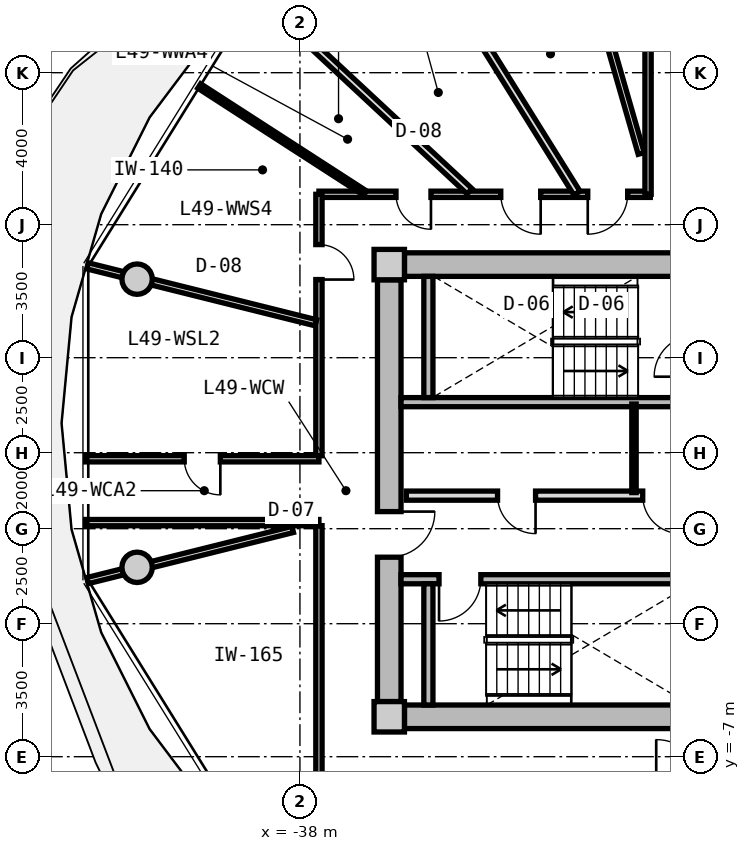
"""IFC4 building model, lengths in metres.
Left out: names, types, materials, properties, quantities, classifications, styles, units other than length and angle.
Written with IfcOpenShell. Run it as: python <this file> out.ifc"""

import sys

from ifc_helpers import new_model, si_unit, direction, frame, frame_2d, origin, origin_2d, place, context, subcontext, project, spatial, rectangle, circle, extrude, source, transform, mapped, element, fill, save


model = new_model("IFC4")
c1 = context("Model", 3, precision=1e-05, world=origin(), true_north=direction((0.0, 1.0)))
c2 = subcontext(c1, "Body", "Model", "MODEL_VIEW")
j1 = project(units=[si_unit("LENGTHUNIT", "METRE"), si_unit("PLANEANGLEUNIT", "RADIAN")], contexts=[c1])
p1 = place(None, origin())
s1 = spatial("IfcSite", under=j1, at=p1, CompositionType="ELEMENT")
p2 = place(p1, origin())
s2 = spatial("IfcBuilding", under=s1, at=p2, CompositionType="ELEMENT")
p3 = place(p2, frame((0.0, 0.0, 158.7)))
s3 = spatial("IfcBuildingStorey", under=s2, at=p3, CompositionType="ELEMENT", Elevation=158.7)
m1 = source(origin(), c2, "Body", "SweptSolid", [
    extrude(rectangle(XDim=0.8, YDim=0.8, at=origin_2d()), origin(), (0.0, 0.0, 1.0), 3.05),
])
for number, where, z_axis, x_axis in (
    (1, (-35.65, -5.95, 0.0), (0.0, 0.0, 1.0), (1.0, 0.0, 0.0)),
    (2, (-35.65, 5.95, 0.0), (0.0, 0.0, 1.0), (1.0, 0.0, 0.0)),
):
    element("IfcColumn", number, at=place(p3, frame(where, z_axis=z_axis, x_axis=x_axis)), inside=s3, PredefinedType="COLUMN", context=c2, shape_type="MappedRepresentation", body=[
        mapped(m1, transform((0.0, 0.0, 0.0), x_axis=(1.0, 0.0, 0.0), y_axis=(0.0, 1.0, 0.0), z_axis=(0.0, 0.0, 1.0), scale=1.0)),
    ])
m2 = source(origin(), c2, "Body", "SweptSolid", [
    extrude(rectangle(XDim=14.5, YDim=0.62, at=frame_2d((7.25, 0.0))), origin(), (0.0, 0.0, 1.0), 2.81),
])
for number, where, z_axis, x_axis in (
    (3, (-35.25, 5.95, 0.0), (0.0, 0.0, 1.0), (1.0, 0.0, 0.0)),
    (4, (-20.75, -5.95, 0.0), (0.0, 0.0, 1.0), (-1.0, 0.0, 0.0)),
):
    element("IfcWall", number, at=place(p3, frame(where, z_axis=z_axis, x_axis=x_axis)), inside=s3, PredefinedType="SHEAR", context=c2, shape_type="MappedRepresentation", body=[
        mapped(m2, transform((0.0, 0.0, 0.0), x_axis=(1.0, 0.0, 0.0), y_axis=(0.0, 1.0, 0.0), z_axis=(0.0, 0.0, 1.0), scale=1.0)),
    ])
m3 = source(origin(), c2, "Body", "SweptSolid", [
    extrude(rectangle(XDim=11.1, YDim=0.62, at=frame_2d((5.55, 0.0))), origin(), (0.0, 0.0, 1.0), 2.81),
])
p4 = place(p3, frame((-35.65, -5.55, 0.0), z_axis=(0.0, 0.0, 1.0), x_axis=(0.0, 1.0, 0.0)))
e5 = element("IfcWall", 5, at=p4, inside=s3, PredefinedType="SHEAR", context=c2, shape_type="MappedRepresentation", body=[
    mapped(m3, transform((0.0, 0.0, 0.0), x_axis=(1.0, 0.0, 0.0), y_axis=(0.0, 1.0, 0.0), z_axis=(0.0, 0.0, 1.0), scale=1.0)),
])
p5 = place(p4, frame((3.8, 0.0, 0.0)))
e6 = element("IfcOpeningElement", 6, at=p5, cuts=e5, PredefinedType="OPENING", context=c2, shape_type="SweptSolid", body=[
    extrude(rectangle(XDim=1.2, YDim=2.15, at=frame_2d((0.6, 1.075))), frame((0.0, 0.32, 0.0), z_axis=(0.0, -1.0, 0.0), x_axis=(1.0, 0.0, 0.0)), (0.0, 0.0, 1.0), 0.64),
])
m4 = source(origin(), c2, "Body", "SweptSolid", [
    extrude(circle(Radius=0.4, at=origin_2d()), origin(), (0.0, 0.0, 1.0), 3.05),
])
for number, where, z_axis, x_axis in (
    (7, (-42.285, 5.567, 0.0), (0.0, 0.0, 1.0), (1.0, 0.0, 0.0)),
    (8, (-42.285, -2.016, 0.0), (0.0, 0.0, 1.0), (1.0, 0.0, 0.0)),
):
    element("IfcColumn", number, at=place(p3, frame(where, z_axis=z_axis, x_axis=x_axis)), inside=s3, PredefinedType="COLUMN", context=c2, shape_type="MappedRepresentation", body=[
        mapped(m4, transform((0.0, 0.0, 0.0), x_axis=(1.0, 0.0, 0.0), y_axis=(0.0, 1.0, 0.0), z_axis=(0.0, 0.0, 1.0), scale=1.0)),
    ])
m5 = source(origin(), c2, "Body", "SweptSolid", [
    extrude(rectangle(XDim=7.88, YDim=0.24, at=frame_2d((3.94, 0.0))), origin(), (0.0, 0.0, 1.0), 2.81),
])
p6 = place(p3, frame((-35.34, 2.33, 0.0), z_axis=(0.0, 0.0, 1.0), x_axis=(1.0, 0.0, 0.0)))
e9 = element("IfcWall", 9, at=p6, inside=s3, PredefinedType="PARTITIONING", context=c2, shape_type="MappedRepresentation", body=[
    mapped(m5, transform((0.0, 0.0, 0.0), x_axis=(1.0, 0.0, 0.0), y_axis=(0.0, 1.0, 0.0), z_axis=(0.0, 0.0, 1.0), scale=1.0)),
])
m6 = source(origin(), c2, "Body", "SweptSolid", [
    extrude(rectangle(XDim=3.19, YDim=0.24, at=frame_2d((1.595, 0.0))), origin(), (0.0, 0.0, 1.0), 2.81),
])
p7 = place(p3, frame((-34.62, 2.45, 0.0), z_axis=(0.0, 0.0, 1.0), x_axis=(0.0, 1.0, 0.0)))
e10 = element("IfcWall", 10, at=p7, inside=s3, PredefinedType="PARTITIONING", context=c2, shape_type="MappedRepresentation", body=[
    mapped(m6, transform((0.0, 0.0, 0.0), x_axis=(1.0, 0.0, 0.0), y_axis=(0.0, 1.0, 0.0), z_axis=(0.0, 0.0, 1.0), scale=1.0)),
])
p8 = place(p3, frame((-35.34, -2.33, 0.0), z_axis=(0.0, 0.0, 1.0), x_axis=(1.0, 0.0, 0.0)))
e11 = element("IfcWall", 11, at=p8, inside=s3, PredefinedType="PARTITIONING", context=c2, shape_type="MappedRepresentation", body=[
    mapped(m5, transform((0.0, 0.0, 0.0), x_axis=(1.0, 0.0, 0.0), y_axis=(0.0, 1.0, 0.0), z_axis=(0.0, 0.0, 1.0), scale=1.0)),
])
p9 = place(p8, frame((1.0, 0.0, 0.0)))
e12 = element("IfcOpeningElement", 12, at=p9, cuts=e11, PredefinedType="OPENING", context=c2, shape_type="SweptSolid", body=[
    extrude(rectangle(XDim=1.1, YDim=2.15, at=frame_2d((0.55, 1.075))), frame((0.0, 0.13, 0.0), z_axis=(0.0, -1.0, 0.0), x_axis=(1.0, 0.0, 0.0)), (0.0, 0.0, 1.0), 0.26),
])
p10 = place(p3, frame((-34.62, -5.64, 0.0), z_axis=(0.0, 0.0, 1.0), x_axis=(0.0, 1.0, 0.0)))
e13 = element("IfcWall", 13, at=p10, inside=s3, PredefinedType="PARTITIONING", context=c2, shape_type="MappedRepresentation", body=[
    mapped(m6, transform((0.0, 0.0, 0.0), x_axis=(1.0, 0.0, 0.0), y_axis=(0.0, 1.0, 0.0), z_axis=(0.0, 0.0, 1.0), scale=1.0)),
])
m7 = source(origin(), c2, "Body", "SweptSolid", [
    extrude(rectangle(XDim=7.62, YDim=0.24, at=frame_2d((3.81, 0.0))), origin(), (0.0, 0.0, 1.0), 2.795),
])
p11 = place(p3, frame((-35.2, -0.13, 0.0), z_axis=(0.0, 0.0, 1.0), x_axis=(1.0, 0.0, 0.0)))
e14 = element("IfcWall", 14, at=p11, inside=s3, PredefinedType="PARTITIONING", context=c2, shape_type="MappedRepresentation", body=[
    mapped(m7, transform((0.0, 0.0, 0.0), x_axis=(1.0, 0.0, 0.0), y_axis=(0.0, 1.0, 0.0), z_axis=(0.0, 0.0, 1.0), scale=1.0)),
])
p12 = place(p11, frame((6.22, 0.0, 0.0)))
e15 = element("IfcOpeningElement", 15, at=p12, cuts=e14, PredefinedType="OPENING", context=c2, shape_type="SweptSolid", body=[
    extrude(rectangle(XDim=1.0, YDim=2.1, at=frame_2d((0.5, 1.05))), frame((0.0, 0.13, 0.0), z_axis=(0.0, -1.0, 0.0), x_axis=(1.0, 0.0, 0.0)), (0.0, 0.0, 1.0), 0.26),
])
p13 = place(p11, frame((2.4, 0.0, 0.0)))
e16 = element("IfcOpeningElement", 16, at=p13, cuts=e14, PredefinedType="OPENING", context=c2, shape_type="SweptSolid", body=[
    extrude(rectangle(XDim=1.0, YDim=2.1, at=frame_2d((0.5, 1.05))), frame((0.0, 0.13, 0.0), z_axis=(0.0, -1.0, 0.0), x_axis=(1.0, 0.0, 0.0)), (0.0, 0.0, 1.0), 0.26),
])
m8 = source(origin(), c2, "Body", "SweptSolid", [
    extrude(rectangle(XDim=2.33, YDim=0.115, at=frame_2d((1.165, 0.0))), origin(), (0.0, 0.0, 1.0), 2.795),
])
p14 = place(p3, frame((-29.21, -0.05, 0.0), z_axis=(0.0, 0.0, 1.0), x_axis=(0.0, 1.0, 0.0)))
e17 = element("IfcWall", 17, at=p14, inside=s3, PredefinedType="PARTITIONING", context=c2, shape_type="MappedRepresentation", body=[
    mapped(m8, transform((0.0, 0.0, 0.0), x_axis=(1.0, 0.0, 0.0), y_axis=(0.0, 1.0, 0.0), z_axis=(0.0, 0.0, 1.0), scale=1.0)),
])
m9 = source(origin(), c2, "Body", "SweptSolid", [
    extrude(rectangle(XDim=8.719, YDim=0.165, at=frame_2d((4.36, 0.0))), origin(), (0.0, 0.0, 1.0), 2.795),
])
p15 = place(p3, frame((-37.5, 7.8, 0.0), z_axis=(0.0, 0.0, 1.0), x_axis=(1.0, 0.0, 0.0)))
e18 = element("IfcWall", 18, at=p15, inside=s3, PredefinedType="PARTITIONING", context=c2, shape_type="MappedRepresentation", body=[
    mapped(m9, transform((0.0, 0.0, 0.0), x_axis=(1.0, 0.0, 0.0), y_axis=(0.0, 1.0, 0.0), z_axis=(0.0, 0.0, 1.0), scale=1.0)),
])
p16 = place(p15, frame((7.073, 0.0, 0.0)))
e19 = element("IfcOpeningElement", 19, at=p16, cuts=e18, PredefinedType="OPENING", context=c2, shape_type="SweptSolid", body=[
    extrude(rectangle(XDim=1.05, YDim=2.15, at=frame_2d((0.525, 1.075))), frame((0.0, 0.093, 0.0), z_axis=(0.0, -1.0, 0.0), x_axis=(1.0, 0.0, 0.0)), (0.0, 0.0, 1.0), 0.185),
])
p17 = place(p15, frame((4.785, 0.0, 0.0)))
e20 = element("IfcOpeningElement", 20, at=p17, cuts=e18, PredefinedType="OPENING", context=c2, shape_type="SweptSolid", body=[
    extrude(rectangle(XDim=1.05, YDim=2.15, at=frame_2d((0.525, 1.075))), frame((0.0, 0.093, 0.0), z_axis=(0.0, -1.0, 0.0), x_axis=(1.0, 0.0, 0.0)), (0.0, 0.0, 1.0), 0.185),
])
p18 = place(p15, frame((2.028, 0.0, 0.0)))
e21 = element("IfcOpeningElement", 21, at=p18, cuts=e18, PredefinedType="OPENING", context=c2, shape_type="SweptSolid", body=[
    extrude(rectangle(XDim=0.92, YDim=2.1, at=frame_2d((0.46, 1.05))), frame((0.0, 0.093, 0.0), z_axis=(0.0, -1.0, 0.0), x_axis=(1.0, 0.0, 0.0)), (0.0, 0.0, 1.0), 0.185),
])
m10 = source(origin(), c2, "Body", "SweptSolid", [
    extrude(rectangle(XDim=6.88, YDim=0.165, at=frame_2d((3.44, 0.0))), origin(), (0.0, 0.0, 1.0), 2.795),
])
p19 = place(p3, frame((-37.5, -7.8, 0.0), z_axis=(0.0, 0.0, 1.0), x_axis=(0.0, 1.0, 0.0)))
e22 = element("IfcWall", 22, at=p19, inside=s3, PredefinedType="PARTITIONING", context=c2, shape_type="MappedRepresentation", body=[
    mapped(m10, transform((0.0, 0.0, 0.0), x_axis=(1.0, 0.0, 0.0), y_axis=(0.0, 1.0, 0.0), z_axis=(0.0, 0.0, 1.0), scale=1.0)),
])
p20 = place(p3, frame((-37.5, 0.92, 0.0), z_axis=(0.0, 0.0, 1.0), x_axis=(0.0, 1.0, 0.0)))
e23 = element("IfcWall", 23, at=p20, inside=s3, PredefinedType="PARTITIONING", context=c2, shape_type="MappedRepresentation", body=[
    mapped(m10, transform((0.0, 0.0, 0.0), x_axis=(1.0, 0.0, 0.0), y_axis=(0.0, 1.0, 0.0), z_axis=(0.0, 0.0, 1.0), scale=1.0)),
])
p21 = place(p20, frame((4.636, 0.0, 0.0)))
e24 = element("IfcOpeningElement", 24, at=p21, cuts=e23, PredefinedType="OPENING", context=c2, shape_type="SweptSolid", body=[
    extrude(rectangle(XDim=0.92, YDim=2.1, at=frame_2d((0.46, 1.05))), frame((0.0, 0.093, 0.0), z_axis=(0.0, -1.0, 0.0), x_axis=(1.0, 0.0, 0.0)), (0.0, 0.0, 1.0), 0.185),
])
m11 = source(origin(), c2, "Body", "SweptSolid", [
    extrude(rectangle(XDim=8.695, YDim=0.165, at=frame_2d((4.348, 0.0))), origin(), (0.0, 0.0, 1.0), 2.345),
])
p22 = place(p3, frame((-29.02, 8.875, 0.0), z_axis=(0.0, 0.0, 1.0), x_axis=(-0.276797231892, 0.960928349263, 0.0)))
e25 = element("IfcWall", 25, at=p22, inside=s3, PredefinedType="PARTITIONING", context=c2, shape_type="MappedRepresentation", body=[
    mapped(m11, transform((0.0, 0.0, 0.0), x_axis=(1.0, 0.0, 0.0), y_axis=(0.0, 1.0, 0.0), z_axis=(0.0, 0.0, 1.0), scale=1.0)),
])
m12 = source(origin(), c2, "Body", "SweptSolid", [
    extrude(rectangle(XDim=6.193, YDim=0.165, at=frame_2d((3.096, 0.0))), origin(), (0.0, 0.0, 1.0), 2.345),
])
p23 = place(p3, frame((-37.58, 4.419, 0.0), z_axis=(0.0, 0.0, 1.0), x_axis=(-0.970309243466, 0.241867674657, 0.0)))
e26 = element("IfcWall", 26, at=p23, inside=s3, PredefinedType="PARTITIONING", context=c2, shape_type="MappedRepresentation", body=[
    mapped(m12, transform((0.0, 0.0, 0.0), x_axis=(1.0, 0.0, 0.0), y_axis=(0.0, 1.0, 0.0), z_axis=(0.0, 0.0, 1.0), scale=1.0)),
])
m13 = source(origin(), c2, "Body", "SweptSolid", [
    extrude(rectangle(XDim=5.564, YDim=0.165, at=frame_2d((2.782, 0.0))), origin(), (0.0, 0.0, 1.0), 2.345),
])
p24 = place(p3, frame((-38.19, -1.02, 0.0), z_axis=(0.0, 0.0, 1.0), x_axis=(-0.97031260977, -0.241854169533, 0.0)))
e27 = element("IfcWall", 27, at=p24, inside=s3, PredefinedType="PARTITIONING", context=c2, shape_type="MappedRepresentation", body=[
    mapped(m13, transform((0.0, 0.0, 0.0), x_axis=(1.0, 0.0, 0.0), y_axis=(0.0, 1.0, 0.0), z_axis=(0.0, 0.0, 1.0), scale=1.0)),
])
m14 = source(origin(), c2, "Body", "SweptSolid", [
    extrude(rectangle(XDim=9.48, YDim=0.165, at=frame_2d((4.74, 0.0))), origin(), (0.0, 0.0, 1.0), 2.795),
])
p25 = place(p3, frame((-28.84, 7.8, 0.0), z_axis=(0.0, 0.0, 1.0), x_axis=(0.0, 1.0, 0.0)))
e28 = element("IfcWall", 28, at=p25, inside=s3, PredefinedType="PARTITIONING", context=c2, shape_type="MappedRepresentation", body=[
    mapped(m14, transform((0.0, 0.0, 0.0), x_axis=(1.0, 0.0, 0.0), y_axis=(0.0, 1.0, 0.0), z_axis=(0.0, 0.0, 1.0), scale=1.0)),
])
p26 = place(p25, frame((4.521, 0.0, 0.0)))
e29 = element("IfcOpeningElement", 29, at=p26, cuts=e28, PredefinedType="OPENING", context=c2, shape_type="SweptSolid", body=[
    extrude(rectangle(XDim=0.95, YDim=2.1, at=frame_2d((0.475, 1.05))), frame((0.0, 0.093, 0.0), z_axis=(0.0, -1.0, 0.0), x_axis=(1.0, 0.0, 0.0)), (0.0, 0.0, 1.0), 0.185),
])
m15 = source(origin(), c2, "Body", "SweptSolid", [
    extrude(rectangle(XDim=6.139, YDim=0.165, at=frame_2d((3.069, 0.0))), origin(), (0.0, 0.0, 1.0), 2.795),
])
p27 = place(p3, frame((-43.639, 0.84, 0.0), z_axis=(0.0, 0.0, 1.0), x_axis=(1.0, 0.0, 0.0)))
e30 = element("IfcWall", 30, at=p27, inside=s3, PredefinedType="PARTITIONING", context=c2, shape_type="MappedRepresentation", body=[
    mapped(m15, transform((0.0, 0.0, 0.0), x_axis=(1.0, 0.0, 0.0), y_axis=(0.0, 1.0, 0.0), z_axis=(0.0, 0.0, 1.0), scale=1.0)),
])
p28 = place(p27, frame((2.594, 0.0, 0.0)))
e31 = element("IfcOpeningElement", 31, at=p28, cuts=e30, PredefinedType="OPENING", context=c2, shape_type="SweptSolid", body=[
    extrude(rectangle(XDim=0.95, YDim=2.1, at=frame_2d((0.475, 1.05))), frame((0.0, 0.093, 0.0), z_axis=(0.0, -1.0, 0.0), x_axis=(1.0, 0.0, 0.0)), (0.0, 0.0, 1.0), 0.185),
])
p29 = place(p3, frame((-37.5, -0.84, 0.0), z_axis=(0.0, 0.0, 1.0), x_axis=(-1.0, 0.0, 0.0)))
e32 = element("IfcWall", 32, at=p29, inside=s3, PredefinedType="PARTITIONING", context=c2, shape_type="MappedRepresentation", body=[
    mapped(m15, transform((0.0, 0.0, 0.0), x_axis=(1.0, 0.0, 0.0), y_axis=(0.0, 1.0, 0.0), z_axis=(0.0, 0.0, 1.0), scale=1.0)),
])
m16 = source(origin(), c2, "Body", "SweptSolid", [
    extrude(rectangle(XDim=7.648, YDim=0.19, at=frame_2d((3.824, 0.0))), origin(), (0.0, 0.0, 1.0), 2.345),
])
p30 = place(p3, frame((-33.538, 7.88, 0.0), z_axis=(0.0, 0.0, 1.0), x_axis=(-0.732167856666, 0.681124239522, 0.0)))
e33 = element("IfcWall", 33, at=p30, inside=s3, PredefinedType="PARTITIONING", context=c2, shape_type="MappedRepresentation", body=[
    mapped(m16, transform((0.0, 0.0, 0.0), x_axis=(1.0, 0.0, 0.0), y_axis=(0.0, 1.0, 0.0), z_axis=(0.0, 0.0, 1.0), scale=1.0)),
])
m17 = source(origin(), c2, "Body", "SweptSolid", [
    extrude(rectangle(XDim=8.638, YDim=0.19, at=frame_2d((4.319, 0.0))), origin(), (0.0, 0.0, 1.0), 2.795),
])
p31 = place(p3, frame((-30.711, 7.83, 0.0), z_axis=(0.0, 0.0, 1.0), x_axis=(-0.529150133108, 0.848528217935, 0.0)))
e34 = element("IfcWall", 34, at=p31, inside=s3, PredefinedType="PARTITIONING", context=c2, shape_type="MappedRepresentation", body=[
    mapped(m17, transform((0.0, 0.0, 0.0), x_axis=(1.0, 0.0, 0.0), y_axis=(0.0, 1.0, 0.0), z_axis=(0.0, 0.0, 1.0), scale=1.0)),
])
m18 = source(origin(), c2, "Body", "SweptSolid", [
    extrude(rectangle(XDim=5.197, YDim=0.14, at=frame_2d((2.598, 0.0))), origin(), (0.0, 0.0, 1.0), 2.795),
])
p32 = place(p3, frame((-36.286, 7.83, 0.0), z_axis=(0.0, 0.0, 1.0), x_axis=(-0.839929187515, 0.542696010637, 0.0)))
e35 = element("IfcWall", 35, at=p32, inside=s3, PredefinedType="PARTITIONING", context=c2, shape_type="MappedRepresentation", body=[
    mapped(m18, transform((0.0, 0.0, 0.0), x_axis=(1.0, 0.0, 0.0), y_axis=(0.0, 1.0, 0.0), z_axis=(0.0, 0.0, 1.0), scale=1.0)),
])
m19 = source(origin(), c2, "Body", "SweptSolid", [
    extrude(rectangle(XDim=1.1, YDim=2.15, at=frame_2d((0.55, 1.075))), frame((0.0, 0.025, 0.0), z_axis=(0.0, -1.0, 0.0), x_axis=(1.0, 0.0, 0.0)), (0.0, 0.0, 1.0), 0.05),
])
p33 = place(p9, frame((1.1, 0.0, 0.0), z_axis=(0.0, 0.0, 1.0), x_axis=(-1.0, 0.0, 0.0)))
e36 = element("IfcDoor", 36, at=p33, inside=s3, OperationType="SINGLE_SWING_RIGHT", PredefinedType="DOOR", context=c2, shape_type="MappedRepresentation", body=[
    mapped(m19, transform((0.0, 0.0, 0.0), x_axis=(1.0, 0.0, 0.0), y_axis=(0.0, 1.0, 0.0), z_axis=(0.0, 0.0, 1.0), scale=1.0)),
])
fill(e12, e36)
m20 = source(origin(), c2, "Body", "SweptSolid", [
    extrude(rectangle(XDim=1.2, YDim=2.15, at=frame_2d((0.6, 1.075))), frame((0.0, 0.025, 0.0), z_axis=(0.0, -1.0, 0.0), x_axis=(1.0, 0.0, 0.0)), (0.0, 0.0, 1.0), 0.05),
])
p34 = place(p5, frame((1.2, 0.0, 0.0), z_axis=(0.0, 0.0, 1.0), x_axis=(-1.0, 0.0, 0.0)))
e37 = element("IfcDoor", 37, at=p34, inside=s3, OperationType="SINGLE_SWING_LEFT", PredefinedType="DOOR", context=c2, shape_type="MappedRepresentation", body=[
    mapped(m20, transform((0.0, 0.0, 0.0), x_axis=(1.0, 0.0, 0.0), y_axis=(0.0, 1.0, 0.0), z_axis=(0.0, 0.0, 1.0), scale=1.0)),
])
fill(e6, e37)
m21 = source(origin(), c2, "Body", "SweptSolid", [
    extrude(rectangle(XDim=1.0, YDim=2.1, at=frame_2d((0.5, 1.05))), frame((0.0, 0.025, 0.0), z_axis=(0.0, -1.0, 0.0), x_axis=(1.0, 0.0, 0.0)), (0.0, 0.0, 1.0), 0.05),
])
p35 = place(p12, frame((1.0, 0.0, 0.0), z_axis=(0.0, 0.0, 1.0), x_axis=(-1.0, 0.0, 0.0)))
e38 = element("IfcDoor", 38, at=p35, inside=s3, OperationType="SINGLE_SWING_LEFT", PredefinedType="DOOR", context=c2, shape_type="MappedRepresentation", body=[
    mapped(m21, transform((0.0, 0.0, 0.0), x_axis=(1.0, 0.0, 0.0), y_axis=(0.0, 1.0, 0.0), z_axis=(0.0, 0.0, 1.0), scale=1.0)),
])
fill(e15, e38)
p36 = place(p13, frame((1.0, 0.0, 0.0), z_axis=(0.0, 0.0, 1.0), x_axis=(-1.0, 0.0, 0.0)))
e39 = element("IfcDoor", 39, at=p36, inside=s3, OperationType="SINGLE_SWING_LEFT", PredefinedType="DOOR", context=c2, shape_type="MappedRepresentation", body=[
    mapped(m21, transform((0.0, 0.0, 0.0), x_axis=(1.0, 0.0, 0.0), y_axis=(0.0, 1.0, 0.0), z_axis=(0.0, 0.0, 1.0), scale=1.0)),
])
fill(e16, e39)
m22 = source(origin(), c2, "Body", "SweptSolid", [
    extrude(rectangle(XDim=0.95, YDim=2.1, at=frame_2d((0.475, 1.05))), frame((0.0, 0.025, 0.0), z_axis=(0.0, -1.0, 0.0), x_axis=(1.0, 0.0, 0.0)), (0.0, 0.0, 1.0), 0.05),
])
p37 = place(p28, frame((0.95, 0.0, 0.0), z_axis=(0.0, 0.0, 1.0), x_axis=(-1.0, 0.0, 0.0)))
e40 = element("IfcDoor", 40, at=p37, inside=s3, OperationType="SINGLE_SWING_LEFT", PredefinedType="DOOR", context=c2, shape_type="MappedRepresentation", body=[
    mapped(m22, transform((0.0, 0.0, 0.0), x_axis=(1.0, 0.0, 0.0), y_axis=(0.0, 1.0, 0.0), z_axis=(0.0, 0.0, 1.0), scale=1.0)),
])
fill(e31, e40)
m23 = source(origin(), c2, "Body", "SweptSolid", [
    extrude(rectangle(XDim=1.05, YDim=2.15, at=frame_2d((0.525, 1.075))), frame((0.0, 0.025, 0.0), z_axis=(0.0, -1.0, 0.0), x_axis=(1.0, 0.0, 0.0)), (0.0, 0.0, 1.0), 0.05),
])
p38 = place(p16, frame((1.05, 0.0, 0.0), z_axis=(0.0, 0.0, 1.0), x_axis=(-1.0, 0.0, 0.0)))
e41 = element("IfcDoor", 41, at=p38, inside=s3, OperationType="SINGLE_SWING_RIGHT", PredefinedType="DOOR", context=c2, shape_type="MappedRepresentation", body=[
    mapped(m23, transform((0.0, 0.0, 0.0), x_axis=(1.0, 0.0, 0.0), y_axis=(0.0, 1.0, 0.0), z_axis=(0.0, 0.0, 1.0), scale=1.0)),
])
fill(e19, e41)
p39 = place(p17, frame((1.05, 0.0, 0.0), z_axis=(0.0, 0.0, 1.0), x_axis=(-1.0, 0.0, 0.0)))
e42 = element("IfcDoor", 42, at=p39, inside=s3, OperationType="SINGLE_SWING_LEFT", PredefinedType="DOOR", context=c2, shape_type="MappedRepresentation", body=[
    mapped(m23, transform((0.0, 0.0, 0.0), x_axis=(1.0, 0.0, 0.0), y_axis=(0.0, 1.0, 0.0), z_axis=(0.0, 0.0, 1.0), scale=1.0)),
])
fill(e20, e42)
m24 = source(origin(), c2, "Body", "SweptSolid", [
    extrude(rectangle(XDim=0.92, YDim=2.1, at=frame_2d((0.46, 1.05))), frame((0.0, 0.025, 0.0), z_axis=(0.0, -1.0, 0.0), x_axis=(1.0, 0.0, 0.0)), (0.0, 0.0, 1.0), 0.05),
])
p40 = place(p18, frame((0.92, 0.0, 0.0), z_axis=(0.0, 0.0, 1.0), x_axis=(-1.0, 0.0, 0.0)))
e43 = element("IfcDoor", 43, at=p40, inside=s3, OperationType="SINGLE_SWING_LEFT", PredefinedType="DOOR", context=c2, shape_type="MappedRepresentation", body=[
    mapped(m24, transform((0.0, 0.0, 0.0), x_axis=(1.0, 0.0, 0.0), y_axis=(0.0, 1.0, 0.0), z_axis=(0.0, 0.0, 1.0), scale=1.0)),
])
fill(e21, e43)
p41 = place(p21, frame((0.92, 0.0, 0.0), z_axis=(0.0, 0.0, 1.0), x_axis=(-1.0, 0.0, 0.0)))
e44 = element("IfcDoor", 44, at=p41, inside=s3, OperationType="SINGLE_SWING_RIGHT", PredefinedType="DOOR", context=c2, shape_type="MappedRepresentation", body=[
    mapped(m24, transform((0.0, 0.0, 0.0), x_axis=(1.0, 0.0, 0.0), y_axis=(0.0, 1.0, 0.0), z_axis=(0.0, 0.0, 1.0), scale=1.0)),
])
fill(e24, e44)
save(model, sys.argv[1])
